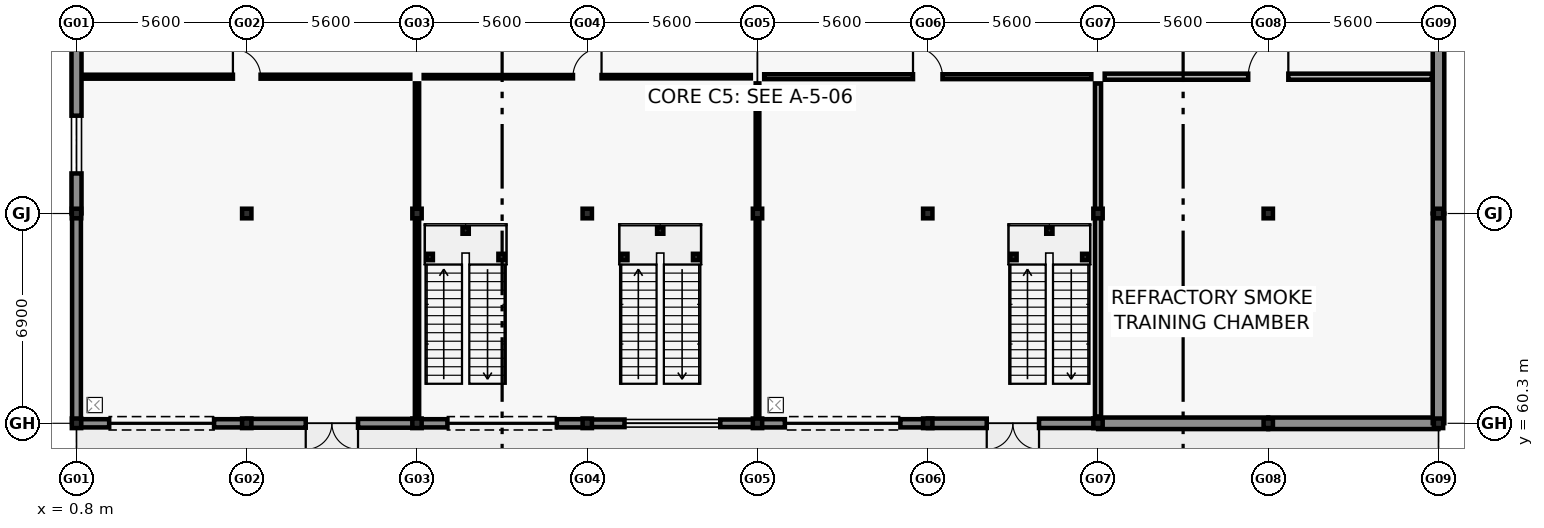
"""IFC4 building model, lengths in metres.
Left out: names, types, materials, properties, quantities, classifications, styles, units other than length and angle.
Written with IfcOpenShell. Run it as: python <this file> out.ifc"""

import sys

from ifc_helpers import new_model, si_unit, direction, frame, frame_2d, origin, origin_2d, place, context, subcontext, project, spatial, rectangle, i_section, extrude, element, fill, save


model = new_model("IFC4")
c1 = context("Model", 3, precision=1e-05, world=origin(), true_north=direction((0.0, 1.0)))
c2 = subcontext(c1, "Body", "Model", "MODEL_VIEW")
j1 = project(units=[si_unit("LENGTHUNIT", "METRE"), si_unit("PLANEANGLEUNIT", "RADIAN")], contexts=[c1])
p1 = place(None, origin())
s1 = spatial("IfcSite", under=j1, at=p1, CompositionType="ELEMENT")
p2 = place(p1, origin())
s2 = spatial("IfcBuilding", under=s1, at=p2, CompositionType="ELEMENT")
p3 = place(p2, origin())
s3 = spatial("IfcBuildingStorey", under=s2, at=p3, CompositionType="ELEMENT", Elevation=0.0)
for number, where, z_axis, x_axis in (
    (1, (0.8, 60.3, 0.0), (0.0, 0.0, 1.0), (1.0, 0.0, 0.0)),
    (2, (0.8, 67.2, 0.0), (0.0, 0.0, 1.0), (1.0, 0.0, 0.0)),
    (3, (6.4, 60.3, 0.0), (0.0, 0.0, 1.0), (1.0, 0.0, 0.0)),
    (4, (6.4, 67.2, 0.0), (0.0, 0.0, 1.0), (1.0, 0.0, 0.0)),
    (5, (12.0, 60.3, 0.0), (0.0, 0.0, 1.0), (1.0, 0.0, 0.0)),
    (6, (12.0, 67.2, 0.0), (0.0, 0.0, 1.0), (1.0, 0.0, 0.0)),
    (7, (17.6, 60.3, 0.0), (0.0, 0.0, 1.0), (1.0, 0.0, 0.0)),
    (8, (17.6, 67.2, 0.0), (0.0, 0.0, 1.0), (1.0, 0.0, 0.0)),
    (9, (23.2, 60.3, 0.0), (0.0, 0.0, 1.0), (1.0, 0.0, 0.0)),
    (10, (23.2, 67.2, 0.0), (0.0, 0.0, 1.0), (1.0, 0.0, 0.0)),
    (11, (28.8, 60.3, 0.0), (0.0, 0.0, 1.0), (1.0, 0.0, 0.0)),
    (12, (28.8, 67.2, 0.0), (0.0, 0.0, 1.0), (1.0, 0.0, 0.0)),
    (13, (34.4, 60.3, 0.0), (0.0, 0.0, 1.0), (1.0, 0.0, 0.0)),
    (14, (34.4, 67.2, 0.0), (0.0, 0.0, 1.0), (1.0, 0.0, 0.0)),
    (15, (40.0, 60.3, 0.0), (0.0, 0.0, 1.0), (1.0, 0.0, 0.0)),
    (16, (40.0, 67.2, 0.0), (0.0, 0.0, 1.0), (1.0, 0.0, 0.0)),
    (17, (45.6, 60.3, 0.0), (0.0, 0.0, 1.0), (1.0, 0.0, 0.0)),
    (18, (45.6, 67.2, 0.0), (0.0, 0.0, 1.0), (1.0, 0.0, 0.0)),
):
    element("IfcColumn", number, at=place(p3, frame(where, z_axis=z_axis, x_axis=x_axis)), inside=s3, PredefinedType="COLUMN", context=c2, shape_type="SweptSolid", body=[
        extrude(i_section(OverallWidth=0.307, OverallDepth=0.315, WebThickness=0.012, FlangeThickness=0.019, FilletRadius=0.017, at=origin_2d()), origin(), (0.0, 0.0, 1.0), 5.4),
    ])
p4 = place(p3, frame((6.395, 60.3, 0.0), z_axis=(0.0, 0.0, 1.0), x_axis=(-1.0, 0.0, 0.0)))
e19 = element("IfcWall", 19, at=p4, inside=s3, PredefinedType="SOLIDWALL", context=c2, shape_type="SweptSolid", body=[
    extrude(rectangle(XDim=5.59, YDim=0.27, at=frame_2d((2.795, 0.0))), origin(), (0.0, 0.0, 1.0), 4.3),
])
p5 = place(p4, frame((1.07, 0.0, 0.0)))
e20 = element("IfcOpeningElement", 20, at=p5, cuts=e19, PredefinedType="OPENING", context=c2, shape_type="SweptSolid", body=[
    extrude(rectangle(XDim=3.45, YDim=4.0, at=frame_2d((1.725, 2.0))), frame((0.0, 0.145, 0.0), z_axis=(0.0, -1.0, 0.0), x_axis=(1.0, 0.0, 0.0)), (0.0, 0.0, 1.0), 0.29),
])
p6 = place(p3, frame((11.995, 60.3, 0.0), z_axis=(0.0, 0.0, 1.0), x_axis=(-1.0, 0.0, 0.0)))
e21 = element("IfcWall", 21, at=p6, inside=s3, PredefinedType="SOLIDWALL", context=c2, shape_type="SweptSolid", body=[
    extrude(rectangle(XDim=5.59, YDim=0.29, at=frame_2d((2.795, 0.0))), origin(), (0.0, 0.0, 1.0), 4.52),
])
p7 = place(p6, frame((1.935, 0.0, 0.0)))
e22 = element("IfcOpeningElement", 22, at=p7, cuts=e21, PredefinedType="OPENING", context=c2, shape_type="SweptSolid", body=[
    extrude(rectangle(XDim=1.72, YDim=2.2, at=frame_2d((0.86, 1.1))), frame((0.0, 0.155, 0.0), z_axis=(0.0, -1.0, 0.0), x_axis=(1.0, 0.0, 0.0)), (0.0, 0.0, 1.0), 0.31),
])
p8 = place(p3, frame((17.595, 60.3, 0.0), z_axis=(0.0, 0.0, 1.0), x_axis=(-1.0, 0.0, 0.0)))
e23 = element("IfcWall", 23, at=p8, inside=s3, PredefinedType="SOLIDWALL", context=c2, shape_type="SweptSolid", body=[
    extrude(rectangle(XDim=5.59, YDim=0.27, at=frame_2d((2.795, 0.0))), origin(), (0.0, 0.0, 1.0), 4.3),
])
p9 = place(p8, frame((0.995, 0.0, 0.0)))
e24 = element("IfcOpeningElement", 24, at=p9, cuts=e23, PredefinedType="OPENING", context=c2, shape_type="SweptSolid", body=[
    extrude(rectangle(XDim=3.6, YDim=4.05, at=frame_2d((1.8, 2.025))), frame((0.0, 0.145, 0.0), z_axis=(0.0, -1.0, 0.0), x_axis=(1.0, 0.0, 0.0)), (0.0, 0.0, 1.0), 0.29),
])
p10 = place(p3, frame((23.195, 60.3, 0.0), z_axis=(0.0, 0.0, 1.0), x_axis=(-1.0, 0.0, 0.0)))
e25 = element("IfcWall", 25, at=p10, inside=s3, PredefinedType="SOLIDWALL", context=c2, shape_type="SweptSolid", body=[
    extrude(rectangle(XDim=5.59, YDim=0.25, at=frame_2d((2.795, 0.0))), origin(), (0.0, 0.0, 1.0), 4.52),
])
p11 = place(p10, frame((1.22, 0.0, 0.8)))
e26 = element("IfcOpeningElement", 26, at=p11, cuts=e25, PredefinedType="OPENING", context=c2, shape_type="SweptSolid", body=[
    extrude(rectangle(XDim=3.15, YDim=2.1, at=frame_2d((1.575, 1.05))), frame((0.0, 0.135, 0.0), z_axis=(0.0, -1.0, 0.0), x_axis=(1.0, 0.0, 0.0)), (0.0, 0.0, 1.0), 0.27),
])
p12 = place(p3, frame((28.795, 60.3, 0.0), z_axis=(0.0, 0.0, 1.0), x_axis=(-1.0, 0.0, 0.0)))
e27 = element("IfcWall", 27, at=p12, inside=s3, PredefinedType="SOLIDWALL", context=c2, shape_type="SweptSolid", body=[
    extrude(rectangle(XDim=5.59, YDim=0.27, at=frame_2d((2.795, 0.0))), origin(), (0.0, 0.0, 1.0), 4.3),
])
p13 = place(p12, frame((0.895, 0.0, 0.0)))
e28 = element("IfcOpeningElement", 28, at=p13, cuts=e27, PredefinedType="OPENING", context=c2, shape_type="SweptSolid", body=[
    extrude(rectangle(XDim=3.8, YDim=4.1, at=frame_2d((1.9, 2.05))), frame((0.0, 0.145, 0.0), z_axis=(0.0, -1.0, 0.0), x_axis=(1.0, 0.0, 0.0)), (0.0, 0.0, 1.0), 0.29),
])
p14 = place(p3, frame((34.395, 60.3, 0.0), z_axis=(0.0, 0.0, 1.0), x_axis=(-1.0, 0.0, 0.0)))
e29 = element("IfcWall", 29, at=p14, inside=s3, PredefinedType="SOLIDWALL", context=c2, shape_type="SweptSolid", body=[
    extrude(rectangle(XDim=5.59, YDim=0.31, at=frame_2d((2.795, 0.0))), origin(), (0.0, 0.0, 1.0), 4.52),
])
p15 = place(p14, frame((1.935, 0.0, 0.0)))
e30 = element("IfcOpeningElement", 30, at=p15, cuts=e29, PredefinedType="OPENING", context=c2, shape_type="SweptSolid", body=[
    extrude(rectangle(XDim=1.72, YDim=2.2, at=frame_2d((0.86, 1.1))), frame((0.0, 0.165, 0.0), z_axis=(0.0, -1.0, 0.0), x_axis=(1.0, 0.0, 0.0)), (0.0, 0.0, 1.0), 0.33),
])
for number, where, z_axis, x_axis in (
    (31, (39.995, 60.3, 0.0), (0.0, 0.0, 1.0), (-1.0, 0.0, 0.0)),
    (32, (45.595, 60.3, 0.0), (0.0, 0.0, 1.0), (-1.0, 0.0, 0.0)),
):
    element("IfcWall", number, at=place(p3, frame(where, z_axis=z_axis, x_axis=x_axis)), inside=s3, PredefinedType="SOLIDWALL", context=c2, shape_type="SweptSolid", body=[
        extrude(rectangle(XDim=5.59, YDim=0.38, at=frame_2d((2.795, 0.0))), origin(), (0.0, 0.0, 1.0), 4.52),
    ])
p16 = place(p3, frame((0.8, 60.305, 0.0), z_axis=(0.0, 0.0, 1.0), x_axis=(0.0, 1.0, 0.0)))
e33 = element("IfcWall", 33, at=p16, inside=s3, PredefinedType="SOLIDWALL", context=c2, shape_type="SweptSolid", body=[
    extrude(rectangle(XDim=6.89, YDim=0.29, at=frame_2d((3.445, 0.0))), origin(), (0.0, 0.0, 1.0), 4.52),
])
p17 = place(p3, frame((45.6, 67.195, 0.0), z_axis=(0.0, 0.0, 1.0), x_axis=(0.0, -1.0, 0.0)))
e34 = element("IfcWall", 34, at=p17, inside=s3, PredefinedType="SOLIDWALL", context=c2, shape_type="SweptSolid", body=[
    extrude(rectangle(XDim=6.89, YDim=0.38, at=frame_2d((3.445, 0.0))), origin(), (0.0, 0.0, 1.0), 4.52),
])
p18 = place(p3, frame((0.8, 67.205, 0.0), z_axis=(0.0, 0.0, 1.0), x_axis=(0.0, 1.0, 0.0)))
e35 = element("IfcWall", 35, at=p18, inside=s3, PredefinedType="SOLIDWALL", context=c2, shape_type="SweptSolid", body=[
    extrude(rectangle(XDim=6.89, YDim=0.33, at=frame_2d((3.445, 0.0))), origin(), (0.0, 0.0, 1.0), 4.52),
])
p19 = place(p18, frame((1.312, 0.0, 0.8)))
e36 = element("IfcOpeningElement", 36, at=p19, cuts=e35, PredefinedType="OPENING", context=c2, shape_type="SweptSolid", body=[
    extrude(rectangle(XDim=1.9, YDim=1.8, at=frame_2d((0.95, 0.9))), frame((0.0, 0.175, 0.0), z_axis=(0.0, -1.0, 0.0), x_axis=(1.0, 0.0, 0.0)), (0.0, 0.0, 1.0), 0.35),
])
p20 = place(p3, frame((45.6, 74.095, 0.0), z_axis=(0.0, 0.0, 1.0), x_axis=(0.0, -1.0, 0.0)))
e37 = element("IfcWall", 37, at=p20, inside=s3, PredefinedType="SOLIDWALL", context=c2, shape_type="SweptSolid", body=[
    extrude(rectangle(XDim=6.89, YDim=0.38, at=frame_2d((3.445, 0.0))), origin(), (0.0, 0.0, 1.0), 4.52),
])
for number, where, z_axis, x_axis in (
    (38, (12.42, 65.77, 0.0), (0.0, 0.0, 1.0), (1.0, 0.0, 0.0)),
    (39, (14.78, 65.77, 0.0), (0.0, 0.0, 1.0), (1.0, 0.0, 0.0)),
    (40, (13.6, 66.64, 0.0), (0.0, 0.0, 1.0), (1.0, 0.0, 0.0)),
    (41, (18.82, 65.77, 0.0), (0.0, 0.0, 1.0), (1.0, 0.0, 0.0)),
    (42, (21.18, 65.77, 0.0), (0.0, 0.0, 1.0), (1.0, 0.0, 0.0)),
    (43, (20.0, 66.64, 0.0), (0.0, 0.0, 1.0), (1.0, 0.0, 0.0)),
    (44, (31.62, 65.77, 0.0), (0.0, 0.0, 1.0), (1.0, 0.0, 0.0)),
    (45, (33.98, 65.77, 0.0), (0.0, 0.0, 1.0), (1.0, 0.0, 0.0)),
    (46, (32.8, 66.64, 0.0), (0.0, 0.0, 1.0), (1.0, 0.0, 0.0)),
):
    element("IfcColumn", number, at=place(p3, frame(where, z_axis=z_axis, x_axis=x_axis)), inside=s3, PredefinedType="COLUMN", context=c2, shape_type="SweptSolid", body=[
        extrude(i_section(OverallWidth=0.205, OverallDepth=0.21, WebThickness=0.009, FlangeThickness=0.014, FilletRadius=0.011, at=origin_2d()), origin(), (0.0, 0.0, 1.0), 2.52),
    ])
p21 = place(p3, frame((12.0, 60.52, 0.0), z_axis=(0.0, 0.0, 1.0), x_axis=(0.0, 1.0, 0.0)))
e47 = element("IfcWall", 47, at=p21, inside=s3, PredefinedType="PARTITIONING", context=c2, shape_type="SweptSolid", body=[
    extrude(rectangle(XDim=10.96, YDim=0.14, at=frame_2d((5.48, 0.0))), origin(), (0.0, 0.0, 1.0), 4.5),
])
p22 = place(p3, frame((1.02, 71.7, 0.0), z_axis=(0.0, 0.0, 1.0), x_axis=(1.0, 0.0, 0.0)))
e48 = element("IfcWall", 48, at=p22, inside=s3, PredefinedType="PARTITIONING", context=c2, shape_type="SweptSolid", body=[
    extrude(rectangle(XDim=10.76, YDim=0.13, at=frame_2d((5.38, 0.0))), origin(), (0.0, 0.0, 1.0), 4.5),
])
p23 = place(p22, frame((4.925, 0.0, 0.0)))
e49 = element("IfcOpeningElement", 49, at=p23, cuts=e48, PredefinedType="OPENING", context=c2, shape_type="SweptSolid", body=[
    extrude(rectangle(XDim=0.91, YDim=2.06, at=frame_2d((0.455, 1.03))), frame((0.0, 0.075, 0.0), z_axis=(0.0, -1.0, 0.0), x_axis=(1.0, 0.0, 0.0)), (0.0, 0.0, 1.0), 0.15),
])
p24 = place(p3, frame((23.2, 60.52, 0.0), z_axis=(0.0, 0.0, 1.0), x_axis=(0.0, 1.0, 0.0)))
e50 = element("IfcWall", 50, at=p24, inside=s3, PredefinedType="PARTITIONING", context=c2, shape_type="SweptSolid", body=[
    extrude(rectangle(XDim=10.96, YDim=0.12, at=frame_2d((5.48, 0.0))), origin(), (0.0, 0.0, 1.0), 4.5),
])
p25 = place(p3, frame((12.22, 71.7, 0.0), z_axis=(0.0, 0.0, 1.0), x_axis=(1.0, 0.0, 0.0)))
e51 = element("IfcWall", 51, at=p25, inside=s3, PredefinedType="PARTITIONING", context=c2, shape_type="SweptSolid", body=[
    extrude(rectangle(XDim=10.76, YDim=0.11, at=frame_2d((5.38, 0.0))), origin(), (0.0, 0.0, 1.0), 4.5),
])
p26 = place(p25, frame((4.91, 0.0, 0.0)))
e52 = element("IfcOpeningElement", 52, at=p26, cuts=e51, PredefinedType="OPENING", context=c2, shape_type="SweptSolid", body=[
    extrude(rectangle(XDim=0.94, YDim=2.08, at=frame_2d((0.47, 1.04))), frame((0.0, 0.065, 0.0), z_axis=(0.0, -1.0, 0.0), x_axis=(1.0, 0.0, 0.0)), (0.0, 0.0, 1.0), 0.13),
])
p27 = place(p3, frame((34.4, 60.52, 0.0), z_axis=(0.0, 0.0, 1.0), x_axis=(0.0, 1.0, 0.0)))
e53 = element("IfcWall", 53, at=p27, inside=s3, PredefinedType="PARTITIONING", context=c2, shape_type="SweptSolid", body=[
    extrude(rectangle(XDim=10.96, YDim=0.2, at=frame_2d((5.48, 0.0))), origin(), (0.0, 0.0, 1.0), 4.5),
])
p28 = place(p3, frame((23.42, 71.7, 0.0), z_axis=(0.0, 0.0, 1.0), x_axis=(1.0, 0.0, 0.0)))
e54 = element("IfcWall", 54, at=p28, inside=s3, PredefinedType="PARTITIONING", context=c2, shape_type="SweptSolid", body=[
    extrude(rectangle(XDim=10.76, YDim=0.16, at=frame_2d((5.38, 0.0))), origin(), (0.0, 0.0, 1.0), 4.5),
])
p29 = place(p28, frame((4.895, 0.0, 0.0)))
e55 = element("IfcOpeningElement", 55, at=p29, cuts=e54, PredefinedType="OPENING", context=c2, shape_type="SweptSolid", body=[
    extrude(rectangle(XDim=0.97, YDim=2.1, at=frame_2d((0.485, 1.05))), frame((0.0, 0.09, 0.0), z_axis=(0.0, -1.0, 0.0), x_axis=(1.0, 0.0, 0.0)), (0.0, 0.0, 1.0), 0.18),
])
p30 = place(p3, frame((34.62, 71.7, 0.0), z_axis=(0.0, 0.0, 1.0), x_axis=(1.0, 0.0, 0.0)))
e56 = element("IfcWall", 56, at=p30, inside=s3, PredefinedType="PARTITIONING", context=c2, shape_type="SweptSolid", body=[
    extrude(rectangle(XDim=10.76, YDim=0.2, at=frame_2d((5.38, 0.0))), origin(), (0.0, 0.0, 1.0), 4.5),
])
p31 = place(p30, frame((4.72, 0.0, 0.0)))
e57 = element("IfcOpeningElement", 57, at=p31, cuts=e56, PredefinedType="OPENING", context=c2, shape_type="SweptSolid", body=[
    extrude(rectangle(XDim=1.32, YDim=2.12, at=frame_2d((0.66, 1.06))), frame((0.0, 0.11, 0.0), z_axis=(0.0, -1.0, 0.0), x_axis=(1.0, 0.0, 0.0)), (0.0, 0.0, 1.0), 0.22),
])
p32 = place(p5, origin())
e58 = element("IfcDoor", 58, at=p32, inside=s3, OperationType="ROLLINGUP", PredefinedType="GATE", context=c2, shape_type="SweptSolid", body=[
    extrude(rectangle(XDim=3.45, YDim=4.0, at=frame_2d((1.725, 2.0))), frame((0.0, 0.025, 0.0), z_axis=(0.0, -1.0, 0.0), x_axis=(1.0, 0.0, 0.0)), (0.0, 0.0, 1.0), 0.05),
])
fill(e20, e58)
p33 = place(p7, origin())
e59 = element("IfcDoor", 59, at=p33, inside=s3, OperationType="DOUBLE_DOOR_SINGLE_SWING", PredefinedType="DOOR", context=c2, shape_type="SweptSolid", body=[
    extrude(rectangle(XDim=1.72, YDim=2.2, at=frame_2d((0.86, 1.1))), frame((0.0, 0.025, 0.0), z_axis=(0.0, -1.0, 0.0), x_axis=(1.0, 0.0, 0.0)), (0.0, 0.0, 1.0), 0.05),
])
fill(e22, e59)
p34 = place(p9, origin())
e60 = element("IfcDoor", 60, at=p34, inside=s3, OperationType="ROLLINGUP", PredefinedType="GATE", context=c2, shape_type="SweptSolid", body=[
    extrude(rectangle(XDim=3.6, YDim=4.05, at=frame_2d((1.8, 2.025))), frame((0.0, 0.025, 0.0), z_axis=(0.0, -1.0, 0.0), x_axis=(1.0, 0.0, 0.0)), (0.0, 0.0, 1.0), 0.05),
])
fill(e24, e60)
p35 = place(p11, origin())
e61 = element("IfcWindow", 61, at=p35, inside=s3, PartitioningType="TRIPLE_PANEL_VERTICAL", PredefinedType="WINDOW", context=c2, shape_type="SweptSolid", body=[
    extrude(rectangle(XDim=3.15, YDim=2.1, at=frame_2d((1.575, 1.05))), frame((0.0, 0.03, 0.0), z_axis=(0.0, -1.0, 0.0), x_axis=(1.0, 0.0, 0.0)), (0.0, 0.0, 1.0), 0.06),
])
fill(e26, e61)
p36 = place(p13, origin())
e62 = element("IfcDoor", 62, at=p36, inside=s3, OperationType="ROLLINGUP", PredefinedType="GATE", context=c2, shape_type="SweptSolid", body=[
    extrude(rectangle(XDim=3.8, YDim=4.1, at=frame_2d((1.9, 2.05))), frame((0.0, 0.025, 0.0), z_axis=(0.0, -1.0, 0.0), x_axis=(1.0, 0.0, 0.0)), (0.0, 0.0, 1.0), 0.05),
])
fill(e28, e62)
p37 = place(p15, origin())
e63 = element("IfcDoor", 63, at=p37, inside=s3, OperationType="DOUBLE_DOOR_SINGLE_SWING", PredefinedType="DOOR", context=c2, shape_type="SweptSolid", body=[
    extrude(rectangle(XDim=1.72, YDim=2.2, at=frame_2d((0.86, 1.1))), frame((0.0, 0.025, 0.0), z_axis=(0.0, -1.0, 0.0), x_axis=(1.0, 0.0, 0.0)), (0.0, 0.0, 1.0), 0.05),
])
fill(e30, e63)
p38 = place(p19, origin())
e64 = element("IfcWindow", 64, at=p38, inside=s3, PartitioningType="DOUBLE_PANEL_VERTICAL", PredefinedType="WINDOW", context=c2, shape_type="SweptSolid", body=[
    extrude(rectangle(XDim=1.9, YDim=1.8, at=frame_2d((0.95, 0.9))), frame((0.0, 0.03, 0.0), z_axis=(0.0, -1.0, 0.0), x_axis=(1.0, 0.0, 0.0)), (0.0, 0.0, 1.0), 0.06),
])
fill(e36, e64)
p39 = place(p23, origin())
e65 = element("IfcDoor", 65, at=p39, inside=s3, OperationType="SINGLE_SWING_LEFT", PredefinedType="DOOR", context=c2, shape_type="SweptSolid", body=[
    extrude(rectangle(XDim=0.91, YDim=2.06, at=frame_2d((0.455, 1.03))), frame((0.0, 0.025, 0.0), z_axis=(0.0, -1.0, 0.0), x_axis=(1.0, 0.0, 0.0)), (0.0, 0.0, 1.0), 0.05),
])
fill(e49, e65)
p40 = place(p26, origin())
e66 = element("IfcDoor", 66, at=p40, inside=s3, OperationType="SINGLE_SWING_RIGHT", PredefinedType="DOOR", context=c2, shape_type="SweptSolid", body=[
    extrude(rectangle(XDim=0.94, YDim=2.08, at=frame_2d((0.47, 1.04))), frame((0.0, 0.025, 0.0), z_axis=(0.0, -1.0, 0.0), x_axis=(1.0, 0.0, 0.0)), (0.0, 0.0, 1.0), 0.05),
])
fill(e52, e66)
p41 = place(p29, origin())
e67 = element("IfcDoor", 67, at=p41, inside=s3, OperationType="SINGLE_SWING_LEFT", PredefinedType="DOOR", context=c2, shape_type="SweptSolid", body=[
    extrude(rectangle(XDim=0.97, YDim=2.1, at=frame_2d((0.485, 1.05))), frame((0.0, 0.025, 0.0), z_axis=(0.0, -1.0, 0.0), x_axis=(1.0, 0.0, 0.0)), (0.0, 0.0, 1.0), 0.05),
])
fill(e55, e67)
p42 = place(p31, origin())
e68 = element("IfcDoor", 68, at=p42, inside=s3, OperationType="SINGLE_SWING_RIGHT", PredefinedType="DOOR", context=c2, shape_type="SweptSolid", body=[
    extrude(rectangle(XDim=1.32, YDim=2.12, at=frame_2d((0.66, 1.06))), frame((0.0, 0.025, 0.0), z_axis=(0.0, -1.0, 0.0), x_axis=(1.0, 0.0, 0.0)), (0.0, 0.0, 1.0), 0.05),
])
fill(e57, e68)
save(model, sys.argv[1])
